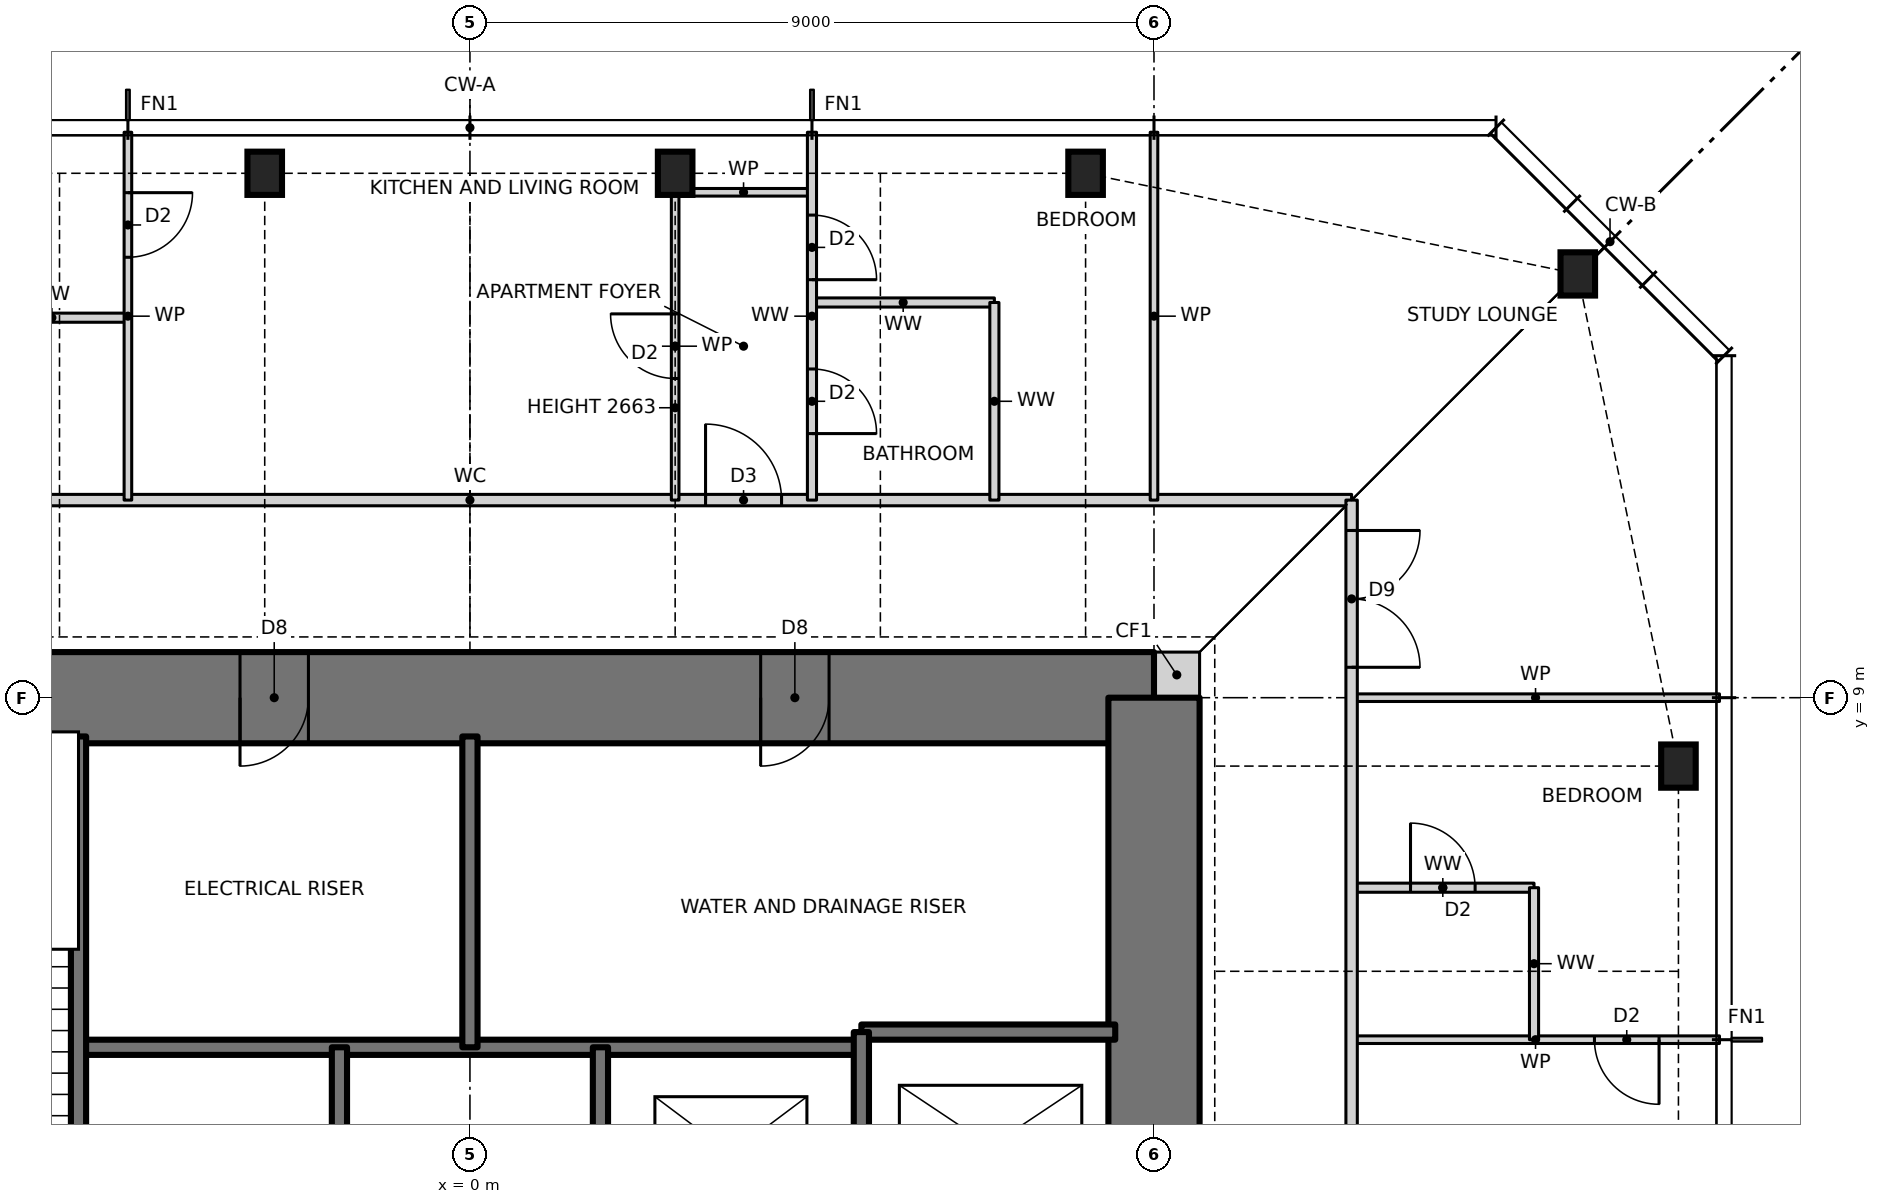
"""IFC4 building model, lengths in metres.
Left out: names, types, materials, properties, quantities, classifications, styles, units other than length and angle.
Written with IfcOpenShell. Run it as: python <this file> out.ifc"""

import sys

from ifc_helpers import new_model, si_unit, direction, frame, frame_2d, origin, origin_2d, place, context, subcontext, project, spatial, rectangle, i_section, extrude, element, fill, save


model = new_model("IFC4")
c1 = context("Model", 3, precision=1e-05, world=origin(), true_north=direction((0.0, 1.0)))
c2 = subcontext(c1, "Body", "Model", "MODEL_VIEW")
j1 = project(units=[si_unit("LENGTHUNIT", "METRE"), si_unit("PLANEANGLEUNIT", "RADIAN")], contexts=[c1])
p1 = place(None, origin())
s1 = spatial("IfcSite", under=j1, at=p1, CompositionType="ELEMENT")
p2 = place(p1, origin())
s2 = spatial("IfcBuilding", under=s1, at=p2, CompositionType="ELEMENT")
p3 = place(p2, frame((0.0, 0.0, 239.5)))
s3 = spatial("IfcBuildingStorey", under=s2, at=p3, CompositionType="ELEMENT", Elevation=239.5)
for number, where, z_axis, x_axis in (
    (1, (15.9, 8.1, 0.0), (0.0, 0.0, 1.0), (1.0, 0.0, 0.0)),
    (2, (14.576, 14.576, 0.0), (0.0, 0.0, 1.0), (1.0, 0.0, 0.0)),
    (3, (8.1, 15.9, 0.0), (0.0, 0.0, 1.0), (1.0, 0.0, 0.0)),
    (4, (2.7, 15.9, 0.0), (0.0, 0.0, 1.0), (1.0, 0.0, 0.0)),
    (5, (-2.7, 15.9, 0.0), (0.0, 0.0, 1.0), (1.0, 0.0, 0.0)),
):
    element("IfcColumn", number, at=place(p3, frame(where, z_axis=z_axis, x_axis=x_axis)), inside=s3, PredefinedType="COLUMN", context=c2, shape_type="SweptSolid", body=[
        extrude(i_section(OverallWidth=0.455, OverallDepth=0.569, WebThickness=0.078, FlangeThickness=0.125, at=origin_2d()), origin(), (0.0, 0.0, 1.0), 3.5),
    ])
p4 = place(p3, frame((9.0, 9.3, 0.0), z_axis=(0.0, 0.0, 1.0), x_axis=(1.0, 0.0, 0.0)))
e6 = element("IfcWall", 6, at=p4, inside=s3, PredefinedType="SOLIDWALL", context=c2, shape_type="SweptSolid", body=[
    extrude(rectangle(XDim=0.6, YDim=0.6, at=frame_2d((0.3, 0.0))), origin(), (0.0, 0.0, 1.0), 3.5),
])
p5 = place(p3, frame((9.0, 9.0, 0.0), z_axis=(0.0, 0.0, 1.0), x_axis=(-1.0, 0.0, 0.0)))
e7 = element("IfcWall", 7, at=p5, inside=s3, PredefinedType="SHEAR", context=c2, shape_type="SweptSolid", body=[
    extrude(rectangle(XDim=18.0, YDim=1.2, at=frame_2d((9.0, 0.0))), origin(), (0.0, 0.0, 1.0), 3.5),
])
p6 = place(p5, frame((11.125, 0.0, 0.0)))
e8 = element("IfcOpeningElement", 8, at=p6, cuts=e7, PredefinedType="OPENING", context=c2, shape_type="SweptSolid", body=[
    extrude(rectangle(XDim=0.9, YDim=2.1, at=frame_2d((0.45, 1.05))), frame((0.0, 0.61, 0.0), z_axis=(0.0, -1.0, 0.0), x_axis=(1.0, 0.0, 0.0)), (0.0, 0.0, 1.0), 1.22),
])
p7 = place(p5, frame((4.275, 0.0, 0.0)))
e9 = element("IfcOpeningElement", 9, at=p7, cuts=e7, PredefinedType="OPENING", context=c2, shape_type="SweptSolid", body=[
    extrude(rectangle(XDim=0.9, YDim=2.1, at=frame_2d((0.45, 1.05))), frame((0.0, 0.61, 0.0), z_axis=(0.0, -1.0, 0.0), x_axis=(1.0, 0.0, 0.0)), (0.0, 0.0, 1.0), 1.22),
])
p8 = place(p3, frame((9.0, -9.0, 0.0), z_axis=(0.0, 0.0, 1.0), x_axis=(0.0, 1.0, 0.0)))
e10 = element("IfcWall", 10, at=p8, inside=s3, PredefinedType="SHEAR", context=c2, shape_type="SweptSolid", body=[
    extrude(rectangle(XDim=18.0, YDim=1.2, at=frame_2d((9.0, 0.0))), origin(), (0.0, 0.0, 1.0), 3.5),
])
p9 = place(p8, frame((8.5, 0.0, 0.0)))
e11 = element("IfcOpeningElement", 11, at=p9, cuts=e10, PredefinedType="OPENING", context=c2, shape_type="SweptSolid", body=[
    extrude(rectangle(XDim=1.0, YDim=2.1, at=frame_2d((0.5, 1.05))), frame((0.0, 0.61, 0.0), z_axis=(0.0, -1.0, 0.0), x_axis=(1.0, 0.0, 0.0)), (0.0, 0.0, 1.0), 1.22),
])
p10 = place(p3, frame((-5.15, 4.4, 0.0), z_axis=(0.0, 0.0, 1.0), x_axis=(1.0, 0.0, 0.0)))
e12 = element("IfcWall", 12, at=p10, inside=s3, PredefinedType="SOLIDWALL", context=c2, shape_type="SweptSolid", body=[
    extrude(rectangle(XDim=10.3, YDim=0.2, at=frame_2d((5.15, 0.0))), origin(), (0.0, 0.0, 1.0), 3.5),
])
p11 = place(p3, frame((11.6, 4.5, 0.0), z_axis=(0.0, 0.0, 1.0), x_axis=(1.0, 0.0, 0.0)))
e13 = element("IfcWall", 13, at=p11, inside=s3, PredefinedType="PARTITIONING", context=c2, shape_type="SweptSolid", body=[
    extrude(rectangle(XDim=4.84, YDim=0.1, at=frame_2d((2.42, 0.0))), origin(), (0.0, 0.0, 1.0), 3.27),
])
p12 = place(p11, frame((3.195, 0.0, 0.0)))
e14 = element("IfcOpeningElement", 14, at=p12, cuts=e13, PredefinedType="OPENING", context=c2, shape_type="SweptSolid", body=[
    extrude(rectangle(XDim=0.85, YDim=2.1, at=frame_2d((0.425, 1.05))), frame((0.0, 0.06, 0.0), z_axis=(0.0, -1.0, 0.0), x_axis=(1.0, 0.0, 0.0)), (0.0, 0.0, 1.0), 0.12),
])
p13 = place(p3, frame((5.15, 4.6, 0.0), z_axis=(0.0, 0.0, 1.0), x_axis=(1.0, 0.0, 0.0)))
e15 = element("IfcWall", 15, at=p13, inside=s3, PredefinedType="SOLIDWALL", context=c2, shape_type="SweptSolid", body=[
    extrude(rectangle(XDim=3.34, YDim=0.2, at=frame_2d((1.67, 0.0))), origin(), (0.0, 0.0, 1.0), 3.5),
])
p14 = place(p3, frame((11.6, 6.5, 0.0), z_axis=(0.0, 0.0, 1.0), x_axis=(1.0, 0.0, 0.0)))
e16 = element("IfcWall", 16, at=p14, inside=s3, PredefinedType="PARTITIONING", context=c2, shape_type="SweptSolid", body=[
    extrude(rectangle(XDim=2.4, YDim=0.12, at=frame_2d((1.2, 0.0))), origin(), (0.0, 0.0, 1.0), 3.27),
])
p15 = place(p14, frame((0.775, 0.0, 0.0)))
e17 = element("IfcOpeningElement", 17, at=p15, cuts=e16, PredefinedType="OPENING", context=c2, shape_type="SweptSolid", body=[
    extrude(rectangle(XDim=0.85, YDim=2.1, at=frame_2d((0.425, 1.05))), frame((0.0, 0.07, 0.0), z_axis=(0.0, -1.0, 0.0), x_axis=(1.0, 0.0, 0.0)), (0.0, 0.0, 1.0), 0.14),
])
p16 = place(p3, frame((11.6, 9.0, 0.0), z_axis=(0.0, 0.0, 1.0), x_axis=(1.0, 0.0, 0.0)))
e18 = element("IfcWall", 18, at=p16, inside=s3, PredefinedType="PARTITIONING", context=c2, shape_type="SweptSolid", body=[
    extrude(rectangle(XDim=4.84, YDim=0.1, at=frame_2d((2.42, 0.0))), origin(), (0.0, 0.0, 1.0), 3.27),
])
p17 = place(p3, frame((-11.6, 11.6, 0.0), z_axis=(0.0, 0.0, 1.0), x_axis=(1.0, 0.0, 0.0)))
e19 = element("IfcWall", 19, at=p17, inside=s3, PredefinedType="PARTITIONING", context=c2, shape_type="SweptSolid", body=[
    extrude(rectangle(XDim=23.2, YDim=0.15, at=frame_2d((11.6, 0.0))), origin(), (0.0, 0.0, 1.0), 3.27),
])
p18 = place(p17, frame((14.7, 0.0, 0.0)))
e20 = element("IfcOpeningElement", 20, at=p18, cuts=e19, PredefinedType="OPENING", context=c2, shape_type="SweptSolid", body=[
    extrude(rectangle(XDim=1.0, YDim=2.1, at=frame_2d((0.5, 1.05))), frame((0.0, 0.085, 0.0), z_axis=(0.0, -1.0, 0.0), x_axis=(1.0, 0.0, 0.0)), (0.0, 0.0, 1.0), 0.17),
])
p19 = place(p17, frame((0.4, 0.0, 0.0)))
e21 = element("IfcOpeningElement", 21, at=p19, cuts=e19, PredefinedType="OPENING", context=c2, shape_type="SweptSolid", body=[
    extrude(rectangle(XDim=1.8, YDim=2.1, at=frame_2d((0.9, 1.05))), frame((0.0, 0.085, 0.0), z_axis=(0.0, -1.0, 0.0), x_axis=(1.0, 0.0, 0.0)), (0.0, 0.0, 1.0), 0.17),
])
p20 = place(p3, frame((-6.5, 14.0, 0.0), z_axis=(0.0, 0.0, 1.0), x_axis=(1.0, 0.0, 0.0)))
e22 = element("IfcWall", 22, at=p20, inside=s3, PredefinedType="PARTITIONING", context=c2, shape_type="SweptSolid", body=[
    extrude(rectangle(XDim=2.0, YDim=0.12, at=frame_2d((1.0, 0.0))), origin(), (0.0, 0.0, 1.0), 3.27),
])
p21 = place(p3, frame((4.5, 14.2, 0.0), z_axis=(0.0, 0.0, 1.0), x_axis=(1.0, 0.0, 0.0)))
e23 = element("IfcWall", 23, at=p21, inside=s3, PredefinedType="PARTITIONING", context=c2, shape_type="SweptSolid", body=[
    extrude(rectangle(XDim=2.4, YDim=0.12, at=frame_2d((1.2, 0.0))), origin(), (0.0, 0.0, 1.0), 3.27),
])
p22 = place(p3, frame((2.7, 15.65, 0.0), z_axis=(0.0, 0.0, 1.0), x_axis=(1.0, 0.0, 0.0)))
e24 = element("IfcWall", 24, at=p22, inside=s3, PredefinedType="PARTITIONING", context=c2, shape_type="SweptSolid", body=[
    extrude(rectangle(XDim=1.8, YDim=0.1, at=frame_2d((0.9, 0.0))), origin(), (0.0, 0.0, 1.0), 3.27),
])
p23 = place(p3, frame((14.0, 4.5, 0.0), z_axis=(0.0, 0.0, 1.0), x_axis=(0.0, 1.0, 0.0)))
e25 = element("IfcWall", 25, at=p23, inside=s3, PredefinedType="PARTITIONING", context=c2, shape_type="SweptSolid", body=[
    extrude(rectangle(XDim=2.0, YDim=0.12, at=frame_2d((1.0, 0.0))), origin(), (0.0, 0.0, 1.0), 3.27),
])
p24 = place(p3, frame((11.6, -11.6, 0.0), z_axis=(0.0, 0.0, 1.0), x_axis=(0.0, 1.0, 0.0)))
e26 = element("IfcWall", 26, at=p24, inside=s3, PredefinedType="PARTITIONING", context=c2, shape_type="SweptSolid", body=[
    extrude(rectangle(XDim=23.2, YDim=0.15, at=frame_2d((11.6, 0.0))), origin(), (0.0, 0.0, 1.0), 3.27),
])
p25 = place(p24, frame((7.5, 0.0, 0.0)))
e27 = element("IfcOpeningElement", 27, at=p25, cuts=e26, PredefinedType="OPENING", context=c2, shape_type="SweptSolid", body=[
    extrude(rectangle(XDim=1.0, YDim=2.1, at=frame_2d((0.5, 1.05))), frame((0.0, 0.085, 0.0), z_axis=(0.0, -1.0, 0.0), x_axis=(1.0, 0.0, 0.0)), (0.0, 0.0, 1.0), 0.17),
])
p26 = place(p24, frame((21.0, 0.0, 0.0)))
e28 = element("IfcOpeningElement", 28, at=p26, cuts=e26, PredefinedType="OPENING", context=c2, shape_type="SweptSolid", body=[
    extrude(rectangle(XDim=1.8, YDim=2.1, at=frame_2d((0.9, 1.05))), frame((0.0, 0.085, 0.0), z_axis=(0.0, -1.0, 0.0), x_axis=(1.0, 0.0, 0.0)), (0.0, 0.0, 1.0), 0.17),
])
p27 = place(p3, frame((9.0, 11.6, 0.0), z_axis=(0.0, 0.0, 1.0), x_axis=(0.0, 1.0, 0.0)))
e29 = element("IfcWall", 29, at=p27, inside=s3, PredefinedType="PARTITIONING", context=c2, shape_type="SweptSolid", body=[
    extrude(rectangle(XDim=4.84, YDim=0.1, at=frame_2d((2.42, 0.0))), origin(), (0.0, 0.0, 1.0), 3.27),
])
p28 = place(p3, frame((6.9, 11.6, 0.0), z_axis=(0.0, 0.0, 1.0), x_axis=(0.0, 1.0, 0.0)))
e30 = element("IfcWall", 30, at=p28, inside=s3, PredefinedType="PARTITIONING", context=c2, shape_type="SweptSolid", body=[
    extrude(rectangle(XDim=2.6, YDim=0.12, at=frame_2d((1.3, 0.0))), origin(), (0.0, 0.0, 1.0), 3.27),
])
p29 = place(p3, frame((5.15, -8.49, 0.0), z_axis=(0.0, 0.0, 1.0), x_axis=(0.0, 1.0, 0.0)))
e31 = element("IfcWall", 31, at=p29, inside=s3, PredefinedType="SOLIDWALL", context=c2, shape_type="SweptSolid", body=[
    extrude(rectangle(XDim=13.09, YDim=0.2, at=frame_2d((6.545, 0.0))), origin(), (0.0, 0.0, 1.0), 3.5),
])
p30 = place(p29, frame((7.89, 0.0, 0.0)))
e32 = element("IfcOpeningElement", 32, at=p30, cuts=e31, PredefinedType="OPENING", context=c2, shape_type="SweptSolid", body=[
    extrude(rectangle(XDim=1.2, YDim=2.1, at=frame_2d((0.6, 1.05))), frame((0.0, 0.11, 0.0), z_axis=(0.0, -1.0, 0.0), x_axis=(1.0, 0.0, 0.0)), (0.0, 0.0, 1.0), 0.22),
])
p31 = place(p3, frame((4.5, 11.6, 0.0), z_axis=(0.0, 0.0, 1.0), x_axis=(0.0, 1.0, 0.0)))
e33 = element("IfcWall", 33, at=p31, inside=s3, PredefinedType="PARTITIONING", context=c2, shape_type="SweptSolid", body=[
    extrude(rectangle(XDim=4.84, YDim=0.12, at=frame_2d((2.42, 0.0))), origin(), (0.0, 0.0, 1.0), 3.27),
])
p32 = place(p31, frame((2.9, 0.0, 0.0)))
e34 = element("IfcOpeningElement", 34, at=p32, cuts=e33, PredefinedType="OPENING", context=c2, shape_type="SweptSolid", body=[
    extrude(rectangle(XDim=0.85, YDim=2.1, at=frame_2d((0.425, 1.05))), frame((0.0, 0.07, 0.0), z_axis=(0.0, -1.0, 0.0), x_axis=(1.0, 0.0, 0.0)), (0.0, 0.0, 1.0), 0.14),
])
p33 = place(p31, frame((0.875, 0.0, 0.0)))
e35 = element("IfcOpeningElement", 35, at=p33, cuts=e33, PredefinedType="OPENING", context=c2, shape_type="SweptSolid", body=[
    extrude(rectangle(XDim=0.85, YDim=2.1, at=frame_2d((0.425, 1.05))), frame((0.0, 0.07, 0.0), z_axis=(0.0, -1.0, 0.0), x_axis=(1.0, 0.0, 0.0)), (0.0, 0.0, 1.0), 0.14),
])
p34 = place(p3, frame((2.7, 11.6, 0.0), z_axis=(0.0, 0.0, 1.0), x_axis=(0.0, 1.0, 0.0)))
e36 = element("IfcWall", 36, at=p34, inside=s3, PredefinedType="PARTITIONING", context=c2, shape_type="SweptSolid", body=[
    extrude(rectangle(XDim=4.05, YDim=0.1, at=frame_2d((2.025, 0.0))), origin(), (0.0, 0.0, 1.0), 2.663),
])
p35 = place(p34, frame((1.6, 0.0, 0.0)))
e37 = element("IfcOpeningElement", 37, at=p35, cuts=e36, PredefinedType="OPENING", context=c2, shape_type="SweptSolid", body=[
    extrude(rectangle(XDim=0.85, YDim=2.1, at=frame_2d((0.425, 1.05))), frame((0.0, 0.06, 0.0), z_axis=(0.0, -1.0, 0.0), x_axis=(1.0, 0.0, 0.0)), (0.0, 0.0, 1.0), 0.12),
])
p36 = place(p3, frame((1.717, 1.6, 0.0), z_axis=(0.0, 0.0, 1.0), x_axis=(0.0, 1.0, 0.0)))
e38 = element("IfcWall", 38, at=p36, inside=s3, PredefinedType="SOLIDWALL", context=c2, shape_type="SweptSolid", body=[
    extrude(rectangle(XDim=2.8, YDim=0.2, at=frame_2d((1.4, 0.0))), origin(), (0.0, 0.0, 1.0), 3.5),
])
p37 = place(p3, frame((0.0, 4.4, 0.0), z_axis=(0.0, 0.0, 1.0), x_axis=(0.0, 1.0, 0.0)))
e39 = element("IfcWall", 39, at=p37, inside=s3, PredefinedType="SOLIDWALL", context=c2, shape_type="SweptSolid", body=[
    extrude(rectangle(XDim=4.09, YDim=0.2, at=frame_2d((2.045, 0.0))), origin(), (0.0, 0.0, 1.0), 3.5),
])
p38 = place(p3, frame((-1.717, 1.6, 0.0), z_axis=(0.0, 0.0, 1.0), x_axis=(0.0, 1.0, 0.0)))
e40 = element("IfcWall", 40, at=p38, inside=s3, PredefinedType="SOLIDWALL", context=c2, shape_type="SweptSolid", body=[
    extrude(rectangle(XDim=2.8, YDim=0.2, at=frame_2d((1.4, 0.0))), origin(), (0.0, 0.0, 1.0), 3.5),
])
p39 = place(p3, frame((-4.5, 11.6, 0.0), z_axis=(0.0, 0.0, 1.0), x_axis=(0.0, 1.0, 0.0)))
e41 = element("IfcWall", 41, at=p39, inside=s3, PredefinedType="PARTITIONING", context=c2, shape_type="SweptSolid", body=[
    extrude(rectangle(XDim=4.84, YDim=0.1, at=frame_2d((2.42, 0.0))), origin(), (0.0, 0.0, 1.0), 3.27),
])
p40 = place(p39, frame((3.195, 0.0, 0.0)))
e42 = element("IfcOpeningElement", 42, at=p40, cuts=e41, PredefinedType="OPENING", context=c2, shape_type="SweptSolid", body=[
    extrude(rectangle(XDim=0.85, YDim=2.1, at=frame_2d((0.425, 1.05))), frame((0.0, 0.06, 0.0), z_axis=(0.0, -1.0, 0.0), x_axis=(1.0, 0.0, 0.0)), (0.0, 0.0, 1.0), 0.12),
])
p41 = place(p3, frame((-5.15, 1.6, 0.0), z_axis=(0.0, 0.0, 1.0), x_axis=(0.0, 1.0, 0.0)))
e43 = element("IfcWall", 43, at=p41, inside=s3, PredefinedType="SOLIDWALL", context=c2, shape_type="SweptSolid", body=[
    extrude(rectangle(XDim=6.89, YDim=0.2, at=frame_2d((3.445, 0.0))), origin(), (0.0, 0.0, 1.0), 3.5),
])
p42 = place(p12, frame((0.85, 0.0, 0.0), z_axis=(0.0, 0.0, 1.0), x_axis=(-1.0, 0.0, 0.0)))
e44 = element("IfcDoor", 44, at=p42, inside=s3, OperationType="SINGLE_SWING_LEFT", PredefinedType="DOOR", context=c2, shape_type="SweptSolid", body=[
    extrude(rectangle(XDim=0.85, YDim=2.1, at=frame_2d((0.425, 1.05))), frame((0.0, 0.025, 0.0), z_axis=(0.0, -1.0, 0.0), x_axis=(1.0, 0.0, 0.0)), (0.0, 0.0, 1.0), 0.05),
])
fill(e14, e44)
p43 = place(p15, origin())
e45 = element("IfcDoor", 45, at=p43, inside=s3, OperationType="SINGLE_SWING_LEFT", PredefinedType="DOOR", context=c2, shape_type="SweptSolid", body=[
    extrude(rectangle(XDim=0.85, YDim=2.1, at=frame_2d((0.425, 1.05))), frame((0.0, 0.025, 0.0), z_axis=(0.0, -1.0, 0.0), x_axis=(1.0, 0.0, 0.0)), (0.0, 0.0, 1.0), 0.05),
])
fill(e17, e45)
p44 = place(p18, origin())
e46 = element("IfcDoor", 46, at=p44, inside=s3, OperationType="SINGLE_SWING_LEFT", PredefinedType="DOOR", context=c2, shape_type="SweptSolid", body=[
    extrude(rectangle(XDim=1.0, YDim=2.1, at=frame_2d((0.5, 1.05))), frame((0.0, 0.025, 0.0), z_axis=(0.0, -1.0, 0.0), x_axis=(1.0, 0.0, 0.0)), (0.0, 0.0, 1.0), 0.05),
])
fill(e20, e46)
p45 = place(p35, origin())
e47 = element("IfcDoor", 47, at=p45, inside=s3, OperationType="SINGLE_SWING_RIGHT", PredefinedType="DOOR", context=c2, shape_type="SweptSolid", body=[
    extrude(rectangle(XDim=0.85, YDim=2.1, at=frame_2d((0.425, 1.05))), frame((0.0, 0.025, 0.0), z_axis=(0.0, -1.0, 0.0), x_axis=(1.0, 0.0, 0.0)), (0.0, 0.0, 1.0), 0.05),
])
fill(e37, e47)
p46 = place(p32, frame((0.85, 0.0, 0.0), z_axis=(0.0, 0.0, 1.0), x_axis=(-1.0, 0.0, 0.0)))
e48 = element("IfcDoor", 48, at=p46, inside=s3, OperationType="SINGLE_SWING_RIGHT", PredefinedType="DOOR", context=c2, shape_type="SweptSolid", body=[
    extrude(rectangle(XDim=0.85, YDim=2.1, at=frame_2d((0.425, 1.05))), frame((0.0, 0.025, 0.0), z_axis=(0.0, -1.0, 0.0), x_axis=(1.0, 0.0, 0.0)), (0.0, 0.0, 1.0), 0.05),
])
fill(e34, e48)
p47 = place(p33, frame((0.85, 0.0, 0.0), z_axis=(0.0, 0.0, 1.0), x_axis=(-1.0, 0.0, 0.0)))
e49 = element("IfcDoor", 49, at=p47, inside=s3, OperationType="SINGLE_SWING_RIGHT", PredefinedType="DOOR", context=c2, shape_type="SweptSolid", body=[
    extrude(rectangle(XDim=0.85, YDim=2.1, at=frame_2d((0.425, 1.05))), frame((0.0, 0.025, 0.0), z_axis=(0.0, -1.0, 0.0), x_axis=(1.0, 0.0, 0.0)), (0.0, 0.0, 1.0), 0.05),
])
fill(e35, e49)
p48 = place(p40, frame((0.85, 0.0, 0.0), z_axis=(0.0, 0.0, 1.0), x_axis=(-1.0, 0.0, 0.0)))
e50 = element("IfcDoor", 50, at=p48, inside=s3, OperationType="SINGLE_SWING_LEFT", PredefinedType="DOOR", context=c2, shape_type="SweptSolid", body=[
    extrude(rectangle(XDim=0.85, YDim=2.1, at=frame_2d((0.425, 1.05))), frame((0.0, 0.025, 0.0), z_axis=(0.0, -1.0, 0.0), x_axis=(1.0, 0.0, 0.0)), (0.0, 0.0, 1.0), 0.05),
])
fill(e42, e50)
p49 = place(p26, frame((1.8, 0.0, 0.0), z_axis=(0.0, 0.0, 1.0), x_axis=(-1.0, 0.0, 0.0)))
e51 = element("IfcDoor", 51, at=p49, inside=s3, OperationType="DOUBLE_DOOR_SINGLE_SWING", PredefinedType="DOOR", context=c2, shape_type="SweptSolid", body=[
    extrude(rectangle(XDim=1.8, YDim=2.1, at=frame_2d((0.9, 1.05))), frame((0.0, 0.025, 0.0), z_axis=(0.0, -1.0, 0.0), x_axis=(1.0, 0.0, 0.0)), (0.0, 0.0, 1.0), 0.05),
])
fill(e28, e51)
p50 = place(p6, origin())
e52 = element("IfcDoor", 52, at=p50, inside=s3, OperationType="SINGLE_SWING_RIGHT", PredefinedType="DOOR", context=c2, shape_type="SweptSolid", body=[
    extrude(rectangle(XDim=0.9, YDim=2.1, at=frame_2d((0.45, 1.05))), frame((0.0, 0.025, 0.0), z_axis=(0.0, -1.0, 0.0), x_axis=(1.0, 0.0, 0.0)), (0.0, 0.0, 1.0), 0.05),
])
fill(e8, e52)
p51 = place(p7, origin())
e53 = element("IfcDoor", 53, at=p51, inside=s3, OperationType="SINGLE_SWING_RIGHT", PredefinedType="DOOR", context=c2, shape_type="SweptSolid", body=[
    extrude(rectangle(XDim=0.9, YDim=2.1, at=frame_2d((0.45, 1.05))), frame((0.0, 0.025, 0.0), z_axis=(0.0, -1.0, 0.0), x_axis=(1.0, 0.0, 0.0)), (0.0, 0.0, 1.0), 0.05),
])
fill(e9, e53)
save(model, sys.argv[1])
